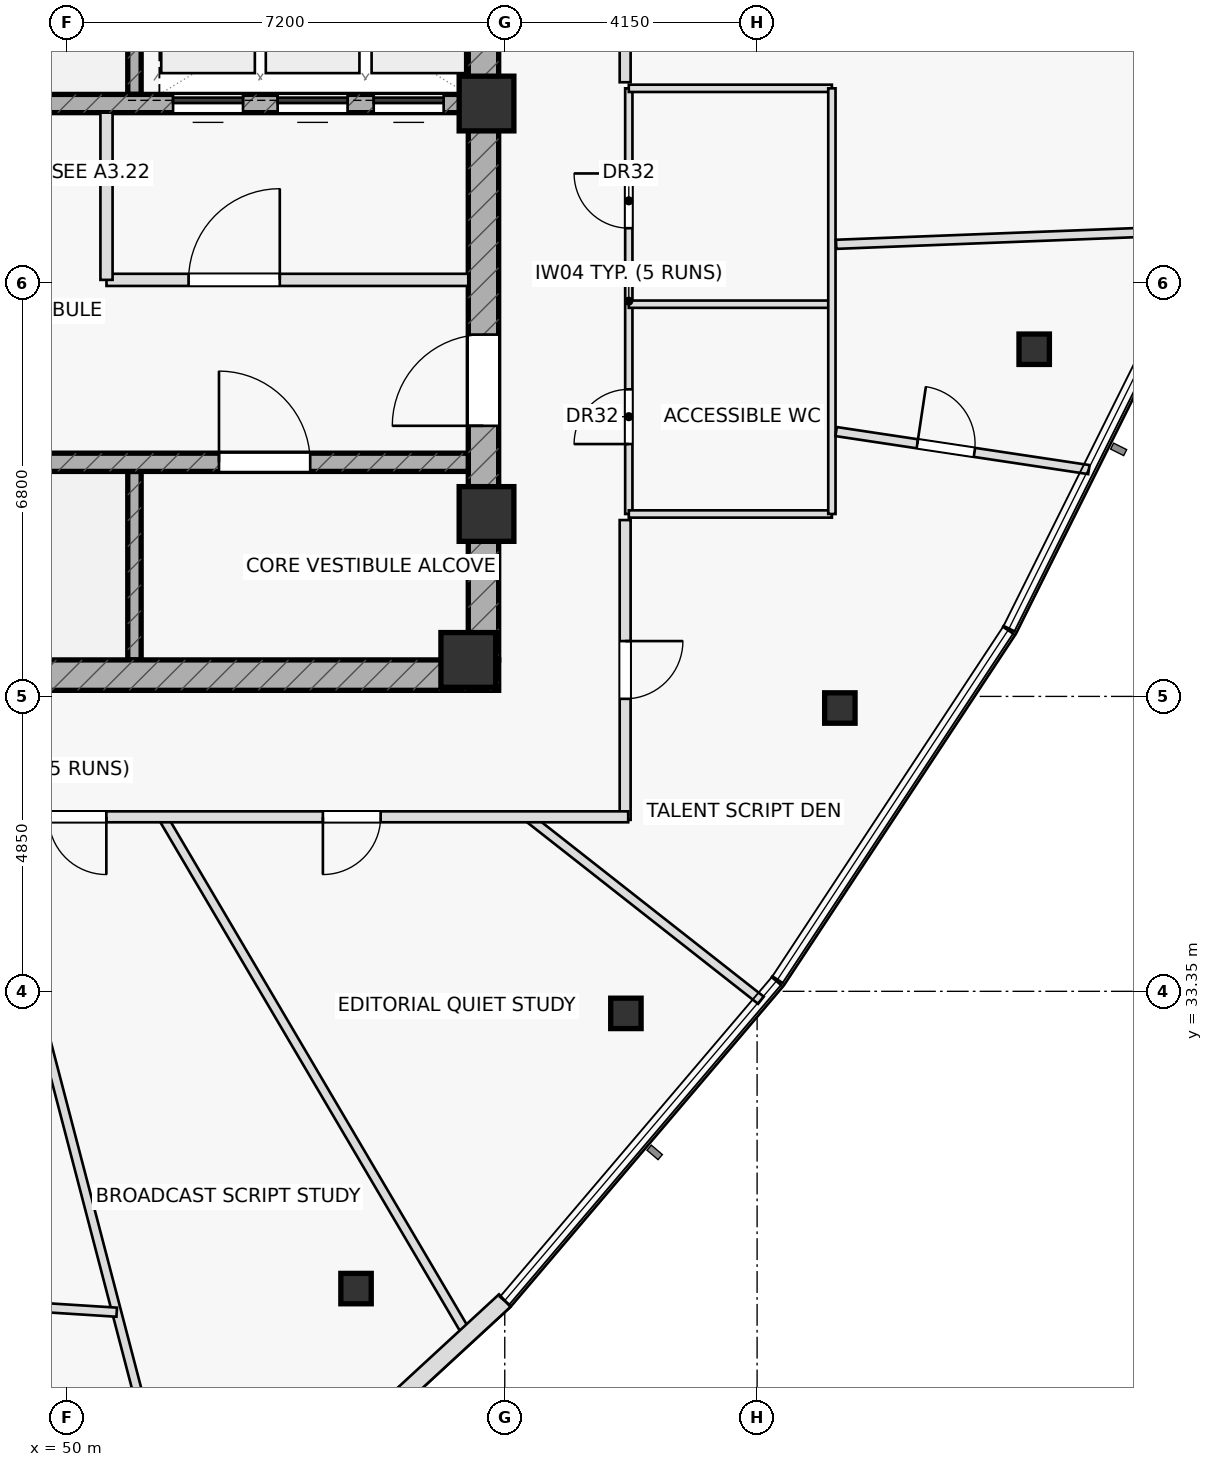
"""IFC4 building model, lengths in metres.
Left out: names, types, materials, properties, quantities, classifications, styles, units other than length and angle.
Written with IfcOpenShell. Run it as: python <this file> out.ifc"""

import sys

from ifc_helpers import new_model, si_unit, direction, frame, frame_2d, origin, origin_2d, place, context, subcontext, project, spatial, rectangle, hollow_rectangle, extrude, element, fill, save


model = new_model("IFC4")
c1 = context("Model", 3, precision=1e-05, world=origin(), true_north=direction((0.0, 1.0)))
c2 = subcontext(c1, "Body", "Model", "MODEL_VIEW")
j1 = project(units=[si_unit("LENGTHUNIT", "METRE"), si_unit("PLANEANGLEUNIT", "RADIAN")], contexts=[c1])
p1 = place(None, origin())
s1 = spatial("IfcSite", under=j1, at=p1, CompositionType="ELEMENT")
p2 = place(p1, origin())
s2 = spatial("IfcBuilding", under=s1, at=p2, CompositionType="ELEMENT")
p3 = place(p2, frame((0.0, 0.0, 265.6)))
s3 = spatial("IfcBuildingStorey", under=s2, at=p3, CompositionType="ELEMENT", Elevation=265.6)
for number, where, z_axis, x_axis in (
    (1, (51.11, 48.1, 0.0), (0.0, 0.0, 1.0), (0.0, 1.0, 0.0)),
    (2, (51.11, 38.8, 0.0), (0.0, 0.0, 1.0), (0.0, 1.0, 0.0)),
):
    element("IfcWall", number, at=place(p3, frame(where, z_axis=z_axis, x_axis=x_axis)), inside=s3, PredefinedType="SHEAR", context=c2, shape_type="SweptSolid", body=[
        extrude(rectangle(XDim=3.1, YDim=0.22, at=frame_2d((1.55, 0.0))), origin(), (0.0, 0.0, 1.0), 3.65),
    ])
p4 = place(p3, frame((42.9, 38.55, 0.0), z_axis=(0.0, 0.0, 1.0), x_axis=(1.0, 0.0, 0.0)))
e3 = element("IfcWall", 3, at=p4, inside=s3, PredefinedType="SHEAR", context=c2, shape_type="SweptSolid", body=[
    extrude(rectangle(XDim=14.2, YDim=0.5, at=frame_2d((7.1, 0.0))), origin(), (0.0, 0.0, 1.0), 3.65),
])
p5 = place(p4, frame((0.78, 0.0, 0.0)))
e4 = element("IfcOpeningElement", 4, at=p5, cuts=e3, PredefinedType="OPENING", context=c2, shape_type="SweptSolid", body=[
    extrude(rectangle(XDim=1.05, YDim=2.2, at=frame_2d((0.525, 1.1))), frame((0.0, 0.26, 0.0), z_axis=(0.0, -1.0, 0.0), x_axis=(1.0, 0.0, 0.0)), (0.0, 0.0, 1.0), 0.52),
])
p6 = place(p3, frame((56.85, 38.8, 0.0), z_axis=(0.0, 0.0, 1.0), x_axis=(0.0, 1.0, 0.0)))
e5 = element("IfcWall", 5, at=p6, inside=s3, PredefinedType="SHEAR", context=c2, shape_type="SweptSolid", body=[
    extrude(rectangle(XDim=12.4, YDim=0.5, at=frame_2d((6.2, 0.0))), origin(), (0.0, 0.0, 1.0), 3.65),
])
p7 = place(p6, frame((3.85, 0.0, 0.0)))
e6 = element("IfcOpeningElement", 6, at=p7, cuts=e5, PredefinedType="OPENING", context=c2, shape_type="SweptSolid", body=[
    extrude(rectangle(XDim=1.5, YDim=2.2, at=frame_2d((0.75, 1.1))), frame((0.0, 0.26, 0.0), z_axis=(0.0, -1.0, 0.0), x_axis=(1.0, 0.0, 0.0)), (0.0, 0.0, 1.0), 0.52),
])
p8 = place(p3, frame((43.4, 47.95, 0.0), z_axis=(0.0, 0.0, 1.0), x_axis=(1.0, 0.0, 0.0)))
e7 = element("IfcWall", 7, at=p8, inside=s3, PredefinedType="SHEAR", context=c2, shape_type="SweptSolid", body=[
    extrude(rectangle(XDim=13.2, YDim=0.3, at=frame_2d((6.6, 0.0))), origin(), (0.0, 0.0, 1.0), 3.65),
])
p9 = place(p8, frame((8.345, 0.0, 0.0)))
e8 = element("IfcOpeningElement", 8, at=p9, cuts=e7, PredefinedType="OPENING", context=c2, shape_type="SweptSolid", body=[
    extrude(rectangle(XDim=1.15, YDim=2.2, at=frame_2d((0.575, 1.1))), frame((0.0, 0.16, 0.0), z_axis=(0.0, -1.0, 0.0), x_axis=(1.0, 0.0, 0.0)), (0.0, 0.0, 1.0), 0.32),
])
p10 = place(p8, frame((10.065, 0.0, 0.0)))
e9 = element("IfcOpeningElement", 9, at=p10, cuts=e7, PredefinedType="OPENING", context=c2, shape_type="SweptSolid", body=[
    extrude(rectangle(XDim=1.15, YDim=2.2, at=frame_2d((0.575, 1.1))), frame((0.0, 0.16, 0.0), z_axis=(0.0, -1.0, 0.0), x_axis=(1.0, 0.0, 0.0)), (0.0, 0.0, 1.0), 0.32),
])
p11 = place(p8, frame((11.645, 0.0, 0.0)))
e10 = element("IfcOpeningElement", 10, at=p11, cuts=e7, PredefinedType="OPENING", context=c2, shape_type="SweptSolid", body=[
    extrude(rectangle(XDim=1.15, YDim=2.2, at=frame_2d((0.575, 1.1))), frame((0.0, 0.16, 0.0), z_axis=(0.0, -1.0, 0.0), x_axis=(1.0, 0.0, 0.0)), (0.0, 0.0, 1.0), 0.32),
])
p12 = place(p3, frame((43.4, 42.05, 0.0), z_axis=(0.0, 0.0, 1.0), x_axis=(1.0, 0.0, 0.0)))
e11 = element("IfcWall", 11, at=p12, inside=s3, PredefinedType="SHEAR", context=c2, shape_type="SweptSolid", body=[
    extrude(rectangle(XDim=13.2, YDim=0.3, at=frame_2d((6.6, 0.0))), origin(), (0.0, 0.0, 1.0), 3.65),
])
p13 = place(p12, frame((9.1, 0.0, 0.0)))
e12 = element("IfcOpeningElement", 12, at=p13, cuts=e11, PredefinedType="OPENING", context=c2, shape_type="SweptSolid", body=[
    extrude(rectangle(XDim=1.5, YDim=2.2, at=frame_2d((0.75, 1.1))), frame((0.0, 0.16, 0.0), z_axis=(0.0, -1.0, 0.0), x_axis=(1.0, 0.0, 0.0)), (0.0, 0.0, 1.0), 0.32),
])
for number, where, z_axis, x_axis in (
    (13, (56.9, 47.95, 0.0), (0.0, 0.0, 1.0), (1.0, 0.0, 0.0)),
    (14, (56.9, 41.2, 0.0), (0.0, 0.0, 1.0), (1.0, 0.0, 0.0)),
    (15, (56.6, 38.8, 0.0), (0.0, 0.0, 1.0), (1.0, 0.0, 0.0)),
):
    element("IfcColumn", number, at=place(p3, frame(where, z_axis=z_axis, x_axis=x_axis)), inside=s3, PredefinedType="COLUMN", context=c2, shape_type="SweptSolid", body=[
        extrude(rectangle(XDim=0.9, YDim=0.9, at=origin_2d()), origin(), (0.0, 0.0, 1.0), 3.65),
    ])
for number, where, z_axis, x_axis in (
    (16, (54.754, 28.462, 0.0), (0.0, 0.0, 1.0), (1.0, 0.0, 0.0)),
    (17, (59.192, 32.987, 0.0), (0.0, 0.0, 1.0), (1.0, 0.0, 0.0)),
    (18, (62.711, 38.009, 0.0), (0.0, 0.0, 1.0), (1.0, 0.0, 0.0)),
    (19, (65.907, 43.909, 0.0), (0.0, 0.0, 1.0), (1.0, 0.0, 0.0)),
):
    element("IfcColumn", number, at=place(p3, frame(where, z_axis=z_axis, x_axis=x_axis)), inside=s3, PredefinedType="COLUMN", context=c2, shape_type="SweptSolid", body=[
        extrude(hollow_rectangle(XDim=0.5, YDim=0.5, WallThickness=0.03, at=origin_2d()), origin(), (0.0, 0.0, 1.0), 3.65),
    ])
p14 = place(p3, frame((50.65, 45.05, 0.0), z_axis=(0.0, 0.0, 1.0), x_axis=(1.0, 0.0, 0.0)))
e20 = element("IfcWall", 20, at=p14, inside=s3, PredefinedType="PARTITIONING", context=c2, shape_type="SweptSolid", body=[
    extrude(rectangle(XDim=5.95, YDim=0.2, at=frame_2d((2.975, 0.0))), origin(), (0.0, 0.0, 1.0), 3.65),
])
p15 = place(p14, frame((1.35, 0.0, 0.0)))
e21 = element("IfcOpeningElement", 21, at=p15, cuts=e20, PredefinedType="OPENING", context=c2, shape_type="SweptSolid", body=[
    extrude(rectangle(XDim=1.5, YDim=2.2, at=frame_2d((0.75, 1.1))), frame((0.0, 0.11, 0.0), z_axis=(0.0, -1.0, 0.0), x_axis=(1.0, 0.0, 0.0)), (0.0, 0.0, 1.0), 0.22),
])
p16 = place(p3, frame((50.65, 45.05, 0.0), z_axis=(0.0, 0.0, 1.0), x_axis=(0.0, 1.0, 0.0)))
e22 = element("IfcWall", 22, at=p16, inside=s3, PredefinedType="PARTITIONING", context=c2, shape_type="SweptSolid", body=[
    extrude(rectangle(XDim=2.75, YDim=0.2, at=frame_2d((1.375, 0.0))), origin(), (0.0, 0.0, 1.0), 3.65),
])
p17 = place(p3, frame((59.24, 41.2, 0.0), z_axis=(0.0, 0.0, 1.0), x_axis=(0.0, 1.0, 0.0)))
e23 = element("IfcWall", 23, at=p17, inside=s3, PredefinedType="PARTITIONING", context=c2, shape_type="SweptSolid", body=[
    extrude(rectangle(XDim=7.0, YDim=0.12, at=frame_2d((3.5, 0.0))), origin(), (0.0, 0.0, 1.0), 3.65),
])
p18 = place(p17, frame((1.15, 0.0, 0.0)))
e24 = element("IfcOpeningElement", 24, at=p18, cuts=e23, PredefinedType="OPENING", context=c2, shape_type="SweptSolid", body=[
    extrude(rectangle(XDim=0.9, YDim=2.05, at=frame_2d((0.45, 1.025))), frame((0.0, 0.07, 0.0), z_axis=(0.0, -1.0, 0.0), x_axis=(1.0, 0.0, 0.0)), (0.0, 0.0, 1.0), 0.14),
])
p19 = place(p17, frame((4.7, 0.0, 0.0)))
e25 = element("IfcOpeningElement", 25, at=p19, cuts=e23, PredefinedType="OPENING", context=c2, shape_type="SweptSolid", body=[
    extrude(rectangle(XDim=0.9, YDim=2.05, at=frame_2d((0.45, 1.025))), frame((0.0, 0.07, 0.0), z_axis=(0.0, -1.0, 0.0), x_axis=(1.0, 0.0, 0.0)), (0.0, 0.0, 1.0), 0.14),
])
p20 = place(p3, frame((59.24, 41.2, 0.0), z_axis=(0.0, 0.0, 1.0), x_axis=(1.0, 0.0, 0.0)))
e26 = element("IfcWall", 26, at=p20, inside=s3, PredefinedType="PARTITIONING", context=c2, shape_type="SweptSolid", body=[
    extrude(rectangle(XDim=3.34, YDim=0.12, at=frame_2d((1.67, 0.0))), origin(), (0.0, 0.0, 1.0), 3.075),
])
for number, where, z_axis, x_axis in (
    (27, (59.24, 44.65, 0.0), (0.0, 0.0, 1.0), (1.0, 0.0, 0.0)),
    (28, (59.24, 48.2, 0.0), (0.0, 0.0, 1.0), (1.0, 0.0, 0.0)),
):
    element("IfcWall", number, at=place(p3, frame(where, z_axis=z_axis, x_axis=x_axis)), inside=s3, PredefinedType="PARTITIONING", context=c2, shape_type="SweptSolid", body=[
        extrude(rectangle(XDim=3.34, YDim=0.12, at=frame_2d((1.67, 0.0))), origin(), (0.0, 0.0, 1.0), 3.65),
    ])
p21 = place(p3, frame((62.58, 41.2, 0.0), z_axis=(0.0, 0.0, 1.0), x_axis=(0.0, 1.0, 0.0)))
e29 = element("IfcWall", 29, at=p21, inside=s3, PredefinedType="PARTITIONING", context=c2, shape_type="SweptSolid", body=[
    extrude(rectangle(XDim=7.0, YDim=0.12, at=frame_2d((3.5, 0.0))), origin(), (0.0, 0.0, 1.0), 3.355),
])
p22 = place(p3, frame((48.692, 36.22, 0.0), z_axis=(0.0, 0.0, 1.0), x_axis=(0.252552587475, -0.967583169841, 0.0)))
e30 = element("IfcWall", 30, at=p22, inside=s3, PredefinedType="PARTITIONING", context=c2, shape_type="SweptSolid", body=[
    extrude(rectangle(XDim=13.156, YDim=0.15, at=frame_2d((6.578, 0.0))), origin(), (0.0, 0.0, 1.0), 3.175),
])
p23 = place(p3, frame((51.571, 36.22, 0.0), z_axis=(0.0, 0.0, 1.0), x_axis=(0.507452319083, -0.861679838372, 0.0)))
e31 = element("IfcWall", 31, at=p23, inside=s3, PredefinedType="PARTITIONING", context=c2, shape_type="SweptSolid", body=[
    extrude(rectangle(XDim=9.898, YDim=0.15, at=frame_2d((4.949, 0.0))), origin(), (0.0, 0.0, 1.0), 3.075),
])
p24 = place(p3, frame((57.574, 36.22, 0.0), z_axis=(0.0, 0.0, 1.0), x_axis=(0.786288837449, -0.617859097289, 0.0)))
e32 = element("IfcWall", 32, at=p24, inside=s3, PredefinedType="PARTITIONING", context=c2, shape_type="SweptSolid", body=[
    extrude(rectangle(XDim=4.882, YDim=0.15, at=frame_2d((2.441, 0.0))), origin(), (0.0, 0.0, 1.0), 3.075),
])
p25 = place(p3, frame((62.65, 42.555, 0.0), z_axis=(0.0, 0.0, 1.0), x_axis=(0.988865945572, -0.148809077977, 0.0)))
e33 = element("IfcWall", 33, at=p25, inside=s3, PredefinedType="PARTITIONING", context=c2, shape_type="SweptSolid", body=[
    extrude(rectangle(XDim=4.203, YDim=0.15, at=frame_2d((2.102, 0.0))), origin(), (0.0, 0.0, 1.0), 3.075),
])
p26 = place(p25, frame((1.35, 0.0, 0.0)))
e34 = element("IfcOpeningElement", 34, at=p26, cuts=e33, PredefinedType="OPENING", context=c2, shape_type="SweptSolid", body=[
    extrude(rectangle(XDim=0.95, YDim=2.05, at=frame_2d((0.475, 1.025))), frame((0.0, 0.085, 0.0), z_axis=(0.0, -1.0, 0.0), x_axis=(1.0, 0.0, 0.0)), (0.0, 0.0, 1.0), 0.17),
])
p27 = place(p3, frame((62.65, 45.635, 0.0), z_axis=(0.0, 0.0, 1.0), x_axis=(0.999238422778, 0.039020179956, 0.0)))
e35 = element("IfcWall", 35, at=p27, inside=s3, PredefinedType="PARTITIONING", context=c2, shape_type="SweptSolid", body=[
    extrude(rectangle(XDim=6.069, YDim=0.15, at=frame_2d((3.035, 0.0))), origin(), (0.0, 0.0, 1.0), 3.175),
])
p28 = place(p3, frame((38.479, 28.856, 0.0), z_axis=(0.0, 0.0, 1.0), x_axis=(0.997995384926, -0.063286741629, 0.0)))
e36 = element("IfcWall", 36, at=p28, inside=s3, PredefinedType="PARTITIONING", context=c2, shape_type="SweptSolid", body=[
    extrude(rectangle(XDim=12.364, YDim=0.15, at=frame_2d((6.182, 0.0))), origin(), (0.0, 0.0, 1.0), 3.175),
])
p29 = place(p28, frame((5.707, 0.0, 0.0)))
e37 = element("IfcOpeningElement", 37, at=p29, cuts=e36, PredefinedType="OPENING", context=c2, shape_type="SweptSolid", body=[
    extrude(rectangle(XDim=0.95, YDim=2.05, at=frame_2d((0.475, 1.025))), frame((0.0, 0.085, 0.0), z_axis=(0.0, -1.0, 0.0), x_axis=(1.0, 0.0, 0.0)), (0.0, 0.0, 1.0), 0.17),
])
p30 = place(p3, frame((59.18, 53.83, 0.0), z_axis=(0.0, 0.0, 1.0), x_axis=(0.0, -1.0, 0.0)))
e38 = element("IfcWall", 38, at=p30, inside=s3, PredefinedType="PARTITIONING", context=c2, shape_type="SweptSolid", body=[
    extrude(rectangle(XDim=5.53, YDim=0.18, at=frame_2d((2.765, 0.0))), origin(), (0.0, 0.0, 1.0), 3.65),
])
p31 = place(p30, frame((3.238, 0.0, 0.0)))
e39 = element("IfcOpeningElement", 39, at=p31, cuts=e38, PredefinedType="OPENING", context=c2, shape_type="SweptSolid", body=[
    extrude(rectangle(XDim=0.95, YDim=2.05, at=frame_2d((0.475, 1.025))), frame((0.0, 0.1, 0.0), z_axis=(0.0, -1.0, 0.0), x_axis=(1.0, 0.0, 0.0)), (0.0, 0.0, 1.0), 0.2),
])
p32 = place(p3, frame((59.18, 41.1, 0.0), z_axis=(0.0, 0.0, 1.0), x_axis=(0.0, -1.0, 0.0)))
e40 = element("IfcWall", 40, at=p32, inside=s3, PredefinedType="PARTITIONING", context=c2, shape_type="SweptSolid", body=[
    extrude(rectangle(XDim=4.93, YDim=0.18, at=frame_2d((2.465, 0.0))), origin(), (0.0, 0.0, 1.0), 3.355),
])
p33 = place(p32, frame((1.99, 0.0, 0.0)))
e41 = element("IfcOpeningElement", 41, at=p33, cuts=e40, PredefinedType="OPENING", context=c2, shape_type="SweptSolid", body=[
    extrude(rectangle(XDim=0.95, YDim=2.05, at=frame_2d((0.475, 1.025))), frame((0.0, 0.1, 0.0), z_axis=(0.0, -1.0, 0.0), x_axis=(1.0, 0.0, 0.0)), (0.0, 0.0, 1.0), 0.2),
])
p34 = place(p3, frame((59.23, 36.22, 0.0), z_axis=(0.0, 0.0, 1.0), x_axis=(-1.0, 0.0, 0.0)))
e42 = element("IfcWall", 42, at=p34, inside=s3, PredefinedType="PARTITIONING", context=c2, shape_type="SweptSolid", body=[
    extrude(rectangle(XDim=19.48, YDim=0.18, at=frame_2d((9.74, 0.0))), origin(), (0.0, 0.0, 1.0), 3.075),
])
p35 = place(p34, frame((4.071, 0.0, 0.0)))
e43 = element("IfcOpeningElement", 43, at=p35, cuts=e42, PredefinedType="OPENING", context=c2, shape_type="SweptSolid", body=[
    extrude(rectangle(XDim=0.95, YDim=2.05, at=frame_2d((0.475, 1.025))), frame((0.0, 0.1, 0.0), z_axis=(0.0, -1.0, 0.0), x_axis=(1.0, 0.0, 0.0)), (0.0, 0.0, 1.0), 0.2),
])
p36 = place(p34, frame((8.583, 0.0, 0.0)))
e44 = element("IfcOpeningElement", 44, at=p36, cuts=e42, PredefinedType="OPENING", context=c2, shape_type="SweptSolid", body=[
    extrude(rectangle(XDim=0.95, YDim=2.05, at=frame_2d((0.475, 1.025))), frame((0.0, 0.1, 0.0), z_axis=(0.0, -1.0, 0.0), x_axis=(1.0, 0.0, 0.0)), (0.0, 0.0, 1.0), 0.2),
])
p37 = place(p34, frame((13.372, 0.0, 0.0)))
e45 = element("IfcOpeningElement", 45, at=p37, cuts=e42, PredefinedType="OPENING", context=c2, shape_type="SweptSolid", body=[
    extrude(rectangle(XDim=0.95, YDim=2.05, at=frame_2d((0.475, 1.025))), frame((0.0, 0.1, 0.0), z_axis=(0.0, -1.0, 0.0), x_axis=(1.0, 0.0, 0.0)), (0.0, 0.0, 1.0), 0.2),
])
p38 = place(p34, frame((17.747, 0.0, 0.0)))
e46 = element("IfcOpeningElement", 46, at=p38, cuts=e42, PredefinedType="OPENING", context=c2, shape_type="SweptSolid", body=[
    extrude(rectangle(XDim=0.95, YDim=2.05, at=frame_2d((0.475, 1.025))), frame((0.0, 0.1, 0.0), z_axis=(0.0, -1.0, 0.0), x_axis=(1.0, 0.0, 0.0)), (0.0, 0.0, 1.0), 0.2),
])
p39 = place(p3, frame((52.102, 23.564, 0.0), z_axis=(0.0, 0.0, 1.0), x_axis=(0.735217687078, 0.677831064948, 0.0)))
e47 = element("IfcWall", 47, at=p39, inside=s3, PredefinedType="STANDARD", context=c2, shape_type="SweptSolid", body=[
    extrude(rectangle(XDim=6.935, YDim=0.28, at=frame_2d((3.467, 0.0))), origin(), (0.0, 0.0, 1.0), 3.65),
])
p40 = place(p7, origin())
e48 = element("IfcDoor", 48, at=p40, inside=s3, OperationType="SINGLE_SWING_LEFT", PredefinedType="DOOR", context=c2, shape_type="SweptSolid", body=[
    extrude(rectangle(XDim=1.5, YDim=2.2, at=frame_2d((0.75, 1.1))), frame((0.0, 0.025, 0.0), z_axis=(0.0, -1.0, 0.0), x_axis=(1.0, 0.0, 0.0)), (0.0, 0.0, 1.0), 0.05),
])
fill(e6, e48)
p41 = place(p15, origin())
e49 = element("IfcDoor", 49, at=p41, inside=s3, OperationType="SINGLE_SWING_RIGHT", PredefinedType="DOOR", context=c2, shape_type="SweptSolid", body=[
    extrude(rectangle(XDim=1.5, YDim=2.2, at=frame_2d((0.75, 1.1))), frame((0.0, 0.025, 0.0), z_axis=(0.0, -1.0, 0.0), x_axis=(1.0, 0.0, 0.0)), (0.0, 0.0, 1.0), 0.05),
])
fill(e21, e49)
p42 = place(p13, origin())
e50 = element("IfcDoor", 50, at=p42, inside=s3, OperationType="SINGLE_SWING_LEFT", PredefinedType="DOOR", context=c2, shape_type="SweptSolid", body=[
    extrude(rectangle(XDim=1.5, YDim=2.2, at=frame_2d((0.75, 1.1))), frame((0.0, 0.025, 0.0), z_axis=(0.0, -1.0, 0.0), x_axis=(1.0, 0.0, 0.0)), (0.0, 0.0, 1.0), 0.05),
])
fill(e12, e50)
p43 = place(p18, origin())
e51 = element("IfcDoor", 51, at=p43, inside=s3, OperationType="SINGLE_SWING_LEFT", PredefinedType="DOOR", context=c2, shape_type="SweptSolid", body=[
    extrude(rectangle(XDim=0.9, YDim=2.05, at=frame_2d((0.45, 1.025))), frame((0.0, 0.025, 0.0), z_axis=(0.0, -1.0, 0.0), x_axis=(1.0, 0.0, 0.0)), (0.0, 0.0, 1.0), 0.05),
])
fill(e24, e51)
p44 = place(p19, origin())
e52 = element("IfcDoor", 52, at=p44, inside=s3, OperationType="SINGLE_SWING_RIGHT", PredefinedType="DOOR", context=c2, shape_type="SweptSolid", body=[
    extrude(rectangle(XDim=0.9, YDim=2.05, at=frame_2d((0.45, 1.025))), frame((0.0, 0.025, 0.0), z_axis=(0.0, -1.0, 0.0), x_axis=(1.0, 0.0, 0.0)), (0.0, 0.0, 1.0), 0.05),
])
fill(e25, e52)
p45 = place(p26, origin())
e53 = element("IfcDoor", 53, at=p45, inside=s3, OperationType="SINGLE_SWING_LEFT", PredefinedType="DOOR", context=c2, shape_type="SweptSolid", body=[
    extrude(rectangle(XDim=0.95, YDim=2.05, at=frame_2d((0.475, 1.025))), frame((0.0, 0.025, 0.0), z_axis=(0.0, -1.0, 0.0), x_axis=(1.0, 0.0, 0.0)), (0.0, 0.0, 1.0), 0.05),
])
fill(e34, e53)
p46 = place(p33, origin())
e54 = element("IfcDoor", 54, at=p46, inside=s3, OperationType="SINGLE_SWING_LEFT", PredefinedType="DOOR", context=c2, shape_type="SweptSolid", body=[
    extrude(rectangle(XDim=0.95, YDim=2.05, at=frame_2d((0.475, 1.025))), frame((0.0, 0.025, 0.0), z_axis=(0.0, -1.0, 0.0), x_axis=(1.0, 0.0, 0.0)), (0.0, 0.0, 1.0), 0.05),
])
fill(e41, e54)
p47 = place(p35, origin())
e55 = element("IfcDoor", 55, at=p47, inside=s3, OperationType="SINGLE_SWING_RIGHT", PredefinedType="DOOR", context=c2, shape_type="SweptSolid", body=[
    extrude(rectangle(XDim=0.95, YDim=2.05, at=frame_2d((0.475, 1.025))), frame((0.0, 0.025, 0.0), z_axis=(0.0, -1.0, 0.0), x_axis=(1.0, 0.0, 0.0)), (0.0, 0.0, 1.0), 0.05),
])
fill(e43, e55)
p48 = place(p36, origin())
e56 = element("IfcDoor", 56, at=p48, inside=s3, OperationType="SINGLE_SWING_LEFT", PredefinedType="DOOR", context=c2, shape_type="SweptSolid", body=[
    extrude(rectangle(XDim=0.95, YDim=2.05, at=frame_2d((0.475, 1.025))), frame((0.0, 0.025, 0.0), z_axis=(0.0, -1.0, 0.0), x_axis=(1.0, 0.0, 0.0)), (0.0, 0.0, 1.0), 0.05),
])
fill(e44, e56)
p49 = place(p9, origin())
e57 = element("IfcDoor", 57, at=p49, inside=s3, OperationType="SLIDING_TO_LEFT", PredefinedType="DOOR", context=c2, shape_type="SweptSolid", body=[
    extrude(rectangle(XDim=1.15, YDim=2.2, at=frame_2d((0.575, 1.1))), frame((0.0, 0.025, 0.0), z_axis=(0.0, -1.0, 0.0), x_axis=(1.0, 0.0, 0.0)), (0.0, 0.0, 1.0), 0.05),
])
fill(e8, e57)
p50 = place(p10, origin())
e58 = element("IfcDoor", 58, at=p50, inside=s3, OperationType="SLIDING_TO_LEFT", PredefinedType="DOOR", context=c2, shape_type="SweptSolid", body=[
    extrude(rectangle(XDim=1.15, YDim=2.2, at=frame_2d((0.575, 1.1))), frame((0.0, 0.025, 0.0), z_axis=(0.0, -1.0, 0.0), x_axis=(1.0, 0.0, 0.0)), (0.0, 0.0, 1.0), 0.05),
])
fill(e9, e58)
p51 = place(p11, origin())
e59 = element("IfcDoor", 59, at=p51, inside=s3, OperationType="SLIDING_TO_LEFT", PredefinedType="DOOR", context=c2, shape_type="SweptSolid", body=[
    extrude(rectangle(XDim=1.15, YDim=2.2, at=frame_2d((0.575, 1.1))), frame((0.0, 0.025, 0.0), z_axis=(0.0, -1.0, 0.0), x_axis=(1.0, 0.0, 0.0)), (0.0, 0.0, 1.0), 0.05),
])
fill(e10, e59)
save(model, sys.argv[1])
